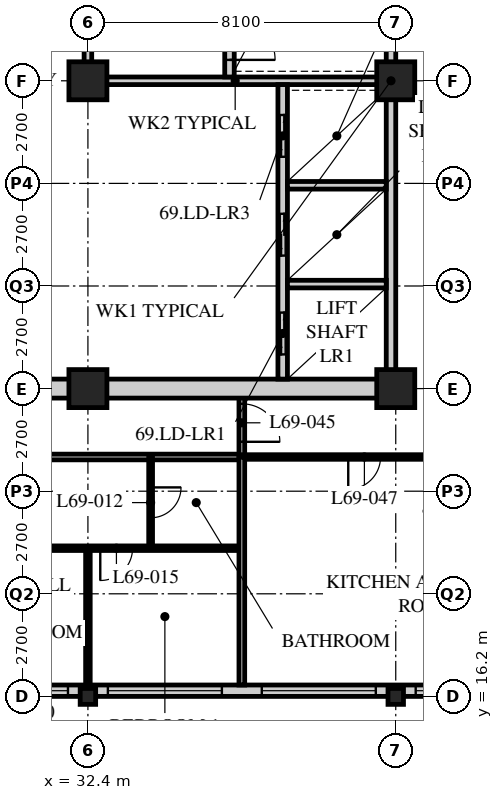
"""IFC4 building model, lengths in metres.
Left out: names, types, materials, properties, quantities, classifications, styles, units other than length and angle.
Written with IfcOpenShell. Run it as: python <this file> out.ifc"""

import sys

from ifc_helpers import new_model, si_unit, direction, frame, frame_2d, origin, origin_2d, place, context, subcontext, project, spatial, rectangle, hollow_rectangle, i_section, extrude, element, fill, save


model = new_model("IFC4")
c1 = context("Model", 3, precision=1e-05, world=origin(), true_north=direction((0.0, 1.0)))
c2 = subcontext(c1, "Body", "Model", "MODEL_VIEW")
j1 = project(units=[si_unit("LENGTHUNIT", "METRE"), si_unit("PLANEANGLEUNIT", "RADIAN")], contexts=[c1])
p1 = place(None, origin())
s1 = spatial("IfcSite", under=j1, at=p1, CompositionType="ELEMENT")
p2 = place(p1, origin())
s2 = spatial("IfcBuilding", under=s1, at=p2, CompositionType="ELEMENT")
p3 = place(p2, frame((0.0, 0.0, 269.7)))
s3 = spatial("IfcBuildingStorey", under=s2, at=p3, CompositionType="ELEMENT", Elevation=269.7)
p4 = place(p3, frame((32.4, 16.2, 0.0), z_axis=(0.0, 0.0, 1.0), x_axis=(1.0, 0.0, 0.0)))
e1 = element("IfcColumn", 1, at=p4, inside=s3, PredefinedType="COLUMN", context=c2, shape_type="SweptSolid", body=[
    extrude(i_section(OverallWidth=0.407, OverallDepth=0.419, WebThickness=0.031, FlangeThickness=0.049, FilletRadius=0.015, at=origin_2d()), origin(), (0.0, 0.0, 1.0), 3.9),
])
for number, where, z_axis, x_axis in (
    (2, (32.4, 24.3, 0.0), (0.0, 0.0, 1.0), (1.0, 0.0, 0.0)),
    (3, (32.4, 32.4, 0.0), (0.0, 0.0, 1.0), (1.0, 0.0, 0.0)),
):
    element("IfcColumn", number, at=place(p3, frame(where, z_axis=z_axis, x_axis=x_axis)), inside=s3, PredefinedType="COLUMN", context=c2, shape_type="SweptSolid", body=[
        extrude(hollow_rectangle(XDim=1.0, YDim=1.0, WallThickness=0.1, at=origin_2d()), origin(), (0.0, 0.0, 1.0), 3.9),
    ])
p5 = place(p3, frame((40.5, 16.2, 0.0), z_axis=(0.0, 0.0, 1.0), x_axis=(1.0, 0.0, 0.0)))
e4 = element("IfcColumn", 4, at=p5, inside=s3, PredefinedType="COLUMN", context=c2, shape_type="SweptSolid", body=[
    extrude(i_section(OverallWidth=0.407, OverallDepth=0.419, WebThickness=0.031, FlangeThickness=0.049, FilletRadius=0.015, at=origin_2d()), origin(), (0.0, 0.0, 1.0), 3.9),
])
for number, where, z_axis, x_axis in (
    (5, (40.5, 24.3, 0.0), (0.0, 0.0, 1.0), (1.0, 0.0, 0.0)),
    (6, (40.5, 32.4, 0.0), (0.0, 0.0, 1.0), (1.0, 0.0, 0.0)),
):
    element("IfcColumn", number, at=place(p3, frame(where, z_axis=z_axis, x_axis=x_axis)), inside=s3, PredefinedType="COLUMN", context=c2, shape_type="SweptSolid", body=[
        extrude(hollow_rectangle(XDim=1.0, YDim=1.0, WallThickness=0.1, at=origin_2d()), origin(), (0.0, 0.0, 1.0), 3.9),
    ])
p6 = place(p3, frame((8.4, 16.35, 0.0), z_axis=(0.0, 0.0, 1.0), x_axis=(1.0, 0.0, 0.0)))
e7 = element("IfcWall", 7, at=p6, inside=s3, PredefinedType="SOLIDWALL", context=c2, shape_type="SweptSolid", body=[
    extrude(rectangle(XDim=40.2, YDim=0.3, at=frame_2d((20.1, 0.0))), origin(), (0.0, 0.0, 1.0), 3.69),
])
p7 = place(p6, frame((0.225, 0.0, 0.6)))
e8 = element("IfcOpeningElement", 8, at=p7, cuts=e7, PredefinedType="OPENING", context=c2, shape_type="SweptSolid", body=[
    extrude(rectangle(XDim=3.0, YDim=2.4, at=frame_2d((1.5, 1.2))), frame((0.0, 0.16, 0.0), z_axis=(0.0, -1.0, 0.0), x_axis=(1.0, 0.0, 0.0)), (0.0, 0.0, 1.0), 0.32),
])
p8 = place(p6, frame((4.275, 0.0, 0.6)))
e9 = element("IfcOpeningElement", 9, at=p8, cuts=e7, PredefinedType="OPENING", context=c2, shape_type="SweptSolid", body=[
    extrude(rectangle(XDim=3.0, YDim=2.4, at=frame_2d((1.5, 1.2))), frame((0.0, 0.16, 0.0), z_axis=(0.0, -1.0, 0.0), x_axis=(1.0, 0.0, 0.0)), (0.0, 0.0, 1.0), 0.32),
])
p9 = place(p6, frame((8.325, 0.0, 0.6)))
e10 = element("IfcOpeningElement", 10, at=p9, cuts=e7, PredefinedType="OPENING", context=c2, shape_type="SweptSolid", body=[
    extrude(rectangle(XDim=3.0, YDim=2.4, at=frame_2d((1.5, 1.2))), frame((0.0, 0.16, 0.0), z_axis=(0.0, -1.0, 0.0), x_axis=(1.0, 0.0, 0.0)), (0.0, 0.0, 1.0), 0.32),
])
p10 = place(p6, frame((12.375, 0.0, 0.6)))
e11 = element("IfcOpeningElement", 11, at=p10, cuts=e7, PredefinedType="OPENING", context=c2, shape_type="SweptSolid", body=[
    extrude(rectangle(XDim=3.0, YDim=2.4, at=frame_2d((1.5, 1.2))), frame((0.0, 0.16, 0.0), z_axis=(0.0, -1.0, 0.0), x_axis=(1.0, 0.0, 0.0)), (0.0, 0.0, 1.0), 0.32),
])
p11 = place(p6, frame((16.425, 0.0, 0.6)))
e12 = element("IfcOpeningElement", 12, at=p11, cuts=e7, PredefinedType="OPENING", context=c2, shape_type="SweptSolid", body=[
    extrude(rectangle(XDim=3.0, YDim=2.4, at=frame_2d((1.5, 1.2))), frame((0.0, 0.16, 0.0), z_axis=(0.0, -1.0, 0.0), x_axis=(1.0, 0.0, 0.0)), (0.0, 0.0, 1.0), 0.32),
])
p12 = place(p6, frame((20.475, 0.0, 0.6)))
e13 = element("IfcOpeningElement", 13, at=p12, cuts=e7, PredefinedType="OPENING", context=c2, shape_type="SweptSolid", body=[
    extrude(rectangle(XDim=3.0, YDim=2.4, at=frame_2d((1.5, 1.2))), frame((0.0, 0.16, 0.0), z_axis=(0.0, -1.0, 0.0), x_axis=(1.0, 0.0, 0.0)), (0.0, 0.0, 1.0), 0.32),
])
p13 = place(p6, frame((24.525, 0.0, 0.6)))
e14 = element("IfcOpeningElement", 14, at=p13, cuts=e7, PredefinedType="OPENING", context=c2, shape_type="SweptSolid", body=[
    extrude(rectangle(XDim=3.0, YDim=2.4, at=frame_2d((1.5, 1.2))), frame((0.0, 0.16, 0.0), z_axis=(0.0, -1.0, 0.0), x_axis=(1.0, 0.0, 0.0)), (0.0, 0.0, 1.0), 0.32),
])
p14 = place(p6, frame((28.575, 0.0, 0.6)))
e15 = element("IfcOpeningElement", 15, at=p14, cuts=e7, PredefinedType="OPENING", context=c2, shape_type="SweptSolid", body=[
    extrude(rectangle(XDim=3.0, YDim=2.4, at=frame_2d((1.5, 1.2))), frame((0.0, 0.16, 0.0), z_axis=(0.0, -1.0, 0.0), x_axis=(1.0, 0.0, 0.0)), (0.0, 0.0, 1.0), 0.32),
])
p15 = place(p6, frame((32.625, 0.0, 0.6)))
e16 = element("IfcOpeningElement", 16, at=p15, cuts=e7, PredefinedType="OPENING", context=c2, shape_type="SweptSolid", body=[
    extrude(rectangle(XDim=3.0, YDim=2.4, at=frame_2d((1.5, 1.2))), frame((0.0, 0.16, 0.0), z_axis=(0.0, -1.0, 0.0), x_axis=(1.0, 0.0, 0.0)), (0.0, 0.0, 1.0), 0.32),
])
p16 = place(p6, frame((36.675, 0.0, 0.6)))
e17 = element("IfcOpeningElement", 17, at=p16, cuts=e7, PredefinedType="OPENING", context=c2, shape_type="SweptSolid", body=[
    extrude(rectangle(XDim=3.0, YDim=2.4, at=frame_2d((1.5, 1.2))), frame((0.0, 0.16, 0.0), z_axis=(0.0, -1.0, 0.0), x_axis=(1.0, 0.0, 0.0)), (0.0, 0.0, 1.0), 0.32),
])
p17 = place(p3, frame((12.15, 22.5, 0.0), z_axis=(0.0, 0.0, 1.0), x_axis=(1.0, 0.0, 0.0)))
e18 = element("IfcWall", 18, at=p17, inside=s3, PredefinedType="PARTITIONING", context=c2, shape_type="SweptSolid", body=[
    extrude(rectangle(XDim=24.3, YDim=0.15, at=frame_2d((12.15, 0.0))), origin(), (0.0, 0.0, 1.0), 3.69),
])
p18 = place(p17, frame((4.45, 0.0, 0.0)))
e19 = element("IfcOpeningElement", 19, at=p18, cuts=e18, PredefinedType="OPENING", context=c2, shape_type="SweptSolid", body=[
    extrude(rectangle(XDim=1.0, YDim=2.1, at=frame_2d((0.5, 1.05))), frame((0.0, 0.085, 0.0), z_axis=(0.0, -1.0, 0.0), x_axis=(1.0, 0.0, 0.0)), (0.0, 0.0, 1.0), 0.17),
])
p19 = place(p17, frame((12.55, 0.0, 0.0)))
e20 = element("IfcOpeningElement", 20, at=p19, cuts=e18, PredefinedType="OPENING", context=c2, shape_type="SweptSolid", body=[
    extrude(rectangle(XDim=1.0, YDim=2.1, at=frame_2d((0.5, 1.05))), frame((0.0, 0.085, 0.0), z_axis=(0.0, -1.0, 0.0), x_axis=(1.0, 0.0, 0.0)), (0.0, 0.0, 1.0), 0.17),
])
p20 = place(p17, frame((2.625, 0.0, 0.0)))
e21 = element("IfcOpeningElement", 21, at=p20, cuts=e18, PredefinedType="OPENING", context=c2, shape_type="SweptSolid", body=[
    extrude(rectangle(XDim=1.0, YDim=2.1, at=frame_2d((0.5, 1.05))), frame((0.0, 0.085, 0.0), z_axis=(0.0, -1.0, 0.0), x_axis=(1.0, 0.0, 0.0)), (0.0, 0.0, 1.0), 0.17),
])
p21 = place(p3, frame((36.45, 22.5, 0.0), z_axis=(0.0, 0.0, 1.0), x_axis=(0.0, 1.0, 0.0)))
e22 = element("IfcWall", 22, at=p21, inside=s3, PredefinedType="PARTITIONING", context=c2, shape_type="SweptSolid", body=[
    extrude(rectangle(XDim=1.8, YDim=0.15, at=frame_2d((0.9, 0.0))), origin(), (0.0, 0.0, 1.0), 3.69),
])
p22 = place(p21, frame((0.4, 0.0, 0.0)))
e23 = element("IfcOpeningElement", 23, at=p22, cuts=e22, PredefinedType="OPENING", context=c2, shape_type="SweptSolid", body=[
    extrude(rectangle(XDim=1.0, YDim=2.1, at=frame_2d((0.5, 1.05))), frame((0.0, 0.085, 0.0), z_axis=(0.0, -1.0, 0.0), x_axis=(1.0, 0.0, 0.0)), (0.0, 0.0, 1.0), 0.17),
])
p23 = place(p3, frame((34.05, 22.5, 0.0), z_axis=(0.0, 0.0, 1.0), x_axis=(0.0, -1.0, 0.0)))
e24 = element("IfcWall", 24, at=p23, inside=s3, PredefinedType="PARTITIONING", context=c2, shape_type="SweptSolid", body=[
    extrude(rectangle(XDim=2.4, YDim=0.1, at=frame_2d((1.2, 0.0))), origin(), (0.0, 0.0, 1.0), 3.69),
])
p24 = place(p23, frame((0.8, 0.0, 0.0)))
e25 = element("IfcOpeningElement", 25, at=p24, cuts=e24, PredefinedType="OPENING", context=c2, shape_type="SweptSolid", body=[
    extrude(rectangle(XDim=0.8, YDim=2.1, at=frame_2d((0.4, 1.05))), frame((0.0, 0.06, 0.0), z_axis=(0.0, -1.0, 0.0), x_axis=(1.0, 0.0, 0.0)), (0.0, 0.0, 1.0), 0.12),
])
p25 = place(p3, frame((32.4, 20.1, 0.0), z_axis=(0.0, 0.0, 1.0), x_axis=(0.0, -1.0, 0.0)))
e26 = element("IfcWall", 26, at=p25, inside=s3, PredefinedType="PARTITIONING", context=c2, shape_type="SweptSolid", body=[
    extrude(rectangle(XDim=3.6, YDim=0.12, at=frame_2d((1.8, 0.0))), origin(), (0.0, 0.0, 1.0), 3.078),
])
p26 = place(p3, frame((12.15, 20.1, 0.0), z_axis=(0.0, 0.0, 1.0), x_axis=(1.0, 0.0, 0.0)))
e27 = element("IfcWall", 27, at=p26, inside=s3, PredefinedType="PARTITIONING", context=c2, shape_type="SweptSolid", body=[
    extrude(rectangle(XDim=24.3, YDim=0.12, at=frame_2d((12.15, 0.0))), origin(), (0.0, 0.0, 1.0), 3.69),
])
p27 = place(p26, frame((5.025, 0.0, 0.0)))
e28 = element("IfcOpeningElement", 28, at=p27, cuts=e27, PredefinedType="OPENING", context=c2, shape_type="SweptSolid", body=[
    extrude(rectangle(XDim=0.85, YDim=2.1, at=frame_2d((0.425, 1.05))), frame((0.0, 0.07, 0.0), z_axis=(0.0, -1.0, 0.0), x_axis=(1.0, 0.0, 0.0)), (0.0, 0.0, 1.0), 0.14),
])
p28 = place(p26, frame((8.425, 0.0, 0.0)))
e29 = element("IfcOpeningElement", 29, at=p28, cuts=e27, PredefinedType="OPENING", context=c2, shape_type="SweptSolid", body=[
    extrude(rectangle(XDim=0.85, YDim=2.1, at=frame_2d((0.425, 1.05))), frame((0.0, 0.07, 0.0), z_axis=(0.0, -1.0, 0.0), x_axis=(1.0, 0.0, 0.0)), (0.0, 0.0, 1.0), 0.14),
])
p29 = place(p26, frame((13.125, 0.0, 0.0)))
e30 = element("IfcOpeningElement", 30, at=p29, cuts=e27, PredefinedType="OPENING", context=c2, shape_type="SweptSolid", body=[
    extrude(rectangle(XDim=0.85, YDim=2.1, at=frame_2d((0.425, 1.05))), frame((0.0, 0.07, 0.0), z_axis=(0.0, -1.0, 0.0), x_axis=(1.0, 0.0, 0.0)), (0.0, 0.0, 1.0), 0.14),
])
p30 = place(p26, frame((20.575, 0.0, 0.0)))
e31 = element("IfcOpeningElement", 31, at=p30, cuts=e27, PredefinedType="OPENING", context=c2, shape_type="SweptSolid", body=[
    extrude(rectangle(XDim=0.85, YDim=2.1, at=frame_2d((0.425, 1.05))), frame((0.0, 0.07, 0.0), z_axis=(0.0, -1.0, 0.0), x_axis=(1.0, 0.0, 0.0)), (0.0, 0.0, 1.0), 0.14),
])
p31 = place(p26, frame((2.725, 0.0, 0.0)))
e32 = element("IfcOpeningElement", 32, at=p31, cuts=e27, PredefinedType="OPENING", context=c2, shape_type="SweptSolid", body=[
    extrude(rectangle(XDim=0.85, YDim=2.1, at=frame_2d((0.425, 1.05))), frame((0.0, 0.07, 0.0), z_axis=(0.0, -1.0, 0.0), x_axis=(1.0, 0.0, 0.0)), (0.0, 0.0, 1.0), 0.14),
])
p32 = place(p3, frame((36.45, 22.5, 0.0), z_axis=(0.0, 0.0, 1.0), x_axis=(1.0, 0.0, 0.0)))
e33 = element("IfcWall", 33, at=p32, inside=s3, PredefinedType="PARTITIONING", context=c2, shape_type="SweptSolid", body=[
    extrude(rectangle(XDim=6.45, YDim=0.12, at=frame_2d((3.225, 0.0))), origin(), (0.0, 0.0, 1.0), 3.69),
])
p33 = place(p32, frame((2.8, 0.0, 0.0)))
e34 = element("IfcOpeningElement", 34, at=p33, cuts=e33, PredefinedType="OPENING", context=c2, shape_type="SweptSolid", body=[
    extrude(rectangle(XDim=0.85, YDim=2.1, at=frame_2d((0.425, 1.05))), frame((0.0, 0.07, 0.0), z_axis=(0.0, -1.0, 0.0), x_axis=(1.0, 0.0, 0.0)), (0.0, 0.0, 1.0), 0.14),
])
p34 = place(p3, frame((36.45, 16.5, 0.0), z_axis=(0.0, 0.0, 1.0), x_axis=(0.0, 1.0, 0.0)))
e35 = element("IfcWall", 35, at=p34, inside=s3, PredefinedType="PARTITIONING", context=c2, shape_type="SweptSolid", body=[
    extrude(rectangle(XDim=6.0, YDim=0.15, at=frame_2d((3.0, 0.0))), origin(), (0.0, 0.0, 1.0), 3.69),
])
p35 = place(p3, frame((15.95, 24.3, 0.0), z_axis=(0.0, 0.0, 1.0), x_axis=(1.0, 0.0, 0.0)))
e36 = element("IfcWall", 36, at=p35, inside=s3, PredefinedType="SOLIDWALL", context=c2, shape_type="SweptSolid", body=[
    extrude(rectangle(XDim=24.55, YDim=0.5, at=frame_2d((12.275, 0.0))), origin(), (0.0, 0.0, 1.0), 3.04),
])
p36 = place(p35, frame((11.5, 0.0, 0.0)))
e37 = element("IfcOpeningElement", 37, at=p36, cuts=e36, PredefinedType="OPENING", context=c2, shape_type="SweptSolid", body=[
    extrude(rectangle(XDim=1.8, YDim=2.4, at=frame_2d((0.9, 1.2))), frame((0.0, 0.26, 0.0), z_axis=(0.0, -1.0, 0.0), x_axis=(1.0, 0.0, 0.0)), (0.0, 0.0, 1.0), 0.52),
])
p37 = place(p3, frame((40.375, 24.55, 0.0), z_axis=(0.0, 0.0, 1.0), x_axis=(0.0, 1.0, 0.0)))
e38 = element("IfcWall", 38, at=p37, inside=s3, PredefinedType="SOLIDWALL", context=c2, shape_type="SweptSolid", body=[
    extrude(rectangle(XDim=15.7, YDim=0.25, at=frame_2d((7.85, 0.0))), origin(), (0.0, 0.0, 1.0), 3.078),
])
p38 = place(p3, frame((32.3, 32.4, 0.0), z_axis=(0.0, 0.0, 1.0), x_axis=(1.0, 0.0, 0.0)))
e39 = element("IfcWall", 39, at=p38, inside=s3, PredefinedType="SOLIDWALL", context=c2, shape_type="SweptSolid", body=[
    extrude(rectangle(XDim=7.95, YDim=0.2, at=frame_2d((3.975, 0.0))), origin(), (0.0, 0.0, 1.0), 3.078),
])
p39 = place(p3, frame((32.4, 32.5, 0.0), z_axis=(0.0, 0.0, 1.0), x_axis=(0.0, 1.0, 0.0)))
e40 = element("IfcWall", 40, at=p39, inside=s3, PredefinedType="SOLIDWALL", context=c2, shape_type="SweptSolid", body=[
    extrude(rectangle(XDim=7.75, YDim=0.2, at=frame_2d((3.875, 0.0))), origin(), (0.0, 0.0, 1.0), 3.078),
])
p40 = place(p39, frame((1.9, 0.0, 0.0)))
e41 = element("IfcOpeningElement", 41, at=p40, cuts=e40, PredefinedType="OPENING", context=c2, shape_type="SweptSolid", body=[
    extrude(rectangle(XDim=1.2, YDim=2.1, at=frame_2d((0.6, 1.05))), frame((0.0, 0.11, 0.0), z_axis=(0.0, -1.0, 0.0), x_axis=(1.0, 0.0, 0.0)), (0.0, 0.0, 1.0), 0.22),
])
p41 = place(p3, frame((37.525, 24.55, 0.0), z_axis=(0.0, 0.0, 1.0), x_axis=(0.0, 1.0, 0.0)))
e42 = element("IfcWall", 42, at=p41, inside=s3, PredefinedType="SOLIDWALL", context=c2, shape_type="SweptSolid", body=[
    extrude(rectangle(XDim=7.75, YDim=0.25, at=frame_2d((3.875, 0.0))), origin(), (0.0, 0.0, 1.0), 3.69),
])
p42 = place(p41, frame((0.65, 0.0, 0.0)))
e43 = element("IfcOpeningElement", 43, at=p42, cuts=e42, PredefinedType="OPENING", context=c2, shape_type="SweptSolid", body=[
    extrude(rectangle(XDim=1.1, YDim=2.4, at=frame_2d((0.55, 1.2))), frame((0.0, 0.135, 0.0), z_axis=(0.0, -1.0, 0.0), x_axis=(1.0, 0.0, 0.0)), (0.0, 0.0, 1.0), 0.27),
])
p43 = place(p41, frame((3.25, 0.0, 0.0)))
e44 = element("IfcOpeningElement", 44, at=p43, cuts=e42, PredefinedType="OPENING", context=c2, shape_type="SweptSolid", body=[
    extrude(rectangle(XDim=1.1, YDim=2.4, at=frame_2d((0.55, 1.2))), frame((0.0, 0.135, 0.0), z_axis=(0.0, -1.0, 0.0), x_axis=(1.0, 0.0, 0.0)), (0.0, 0.0, 1.0), 0.27),
])
p44 = place(p41, frame((5.85, 0.0, 0.0)))
e45 = element("IfcOpeningElement", 45, at=p44, cuts=e42, PredefinedType="OPENING", context=c2, shape_type="SweptSolid", body=[
    extrude(rectangle(XDim=1.1, YDim=2.4, at=frame_2d((0.55, 1.2))), frame((0.0, 0.135, 0.0), z_axis=(0.0, -1.0, 0.0), x_axis=(1.0, 0.0, 0.0)), (0.0, 0.0, 1.0), 0.27),
])
for number, where, z_axis, x_axis in (
    (46, (37.65, 27.05, 0.0), (0.0, 0.0, 1.0), (1.0, 0.0, 0.0)),
    (47, (37.65, 29.65, 0.0), (0.0, 0.0, 1.0), (1.0, 0.0, 0.0)),
):
    element("IfcWall", number, at=place(p3, frame(where, z_axis=z_axis, x_axis=x_axis)), inside=s3, PredefinedType="SOLIDWALL", context=c2, shape_type="SweptSolid", body=[
        extrude(rectangle(XDim=2.6, YDim=0.2, at=frame_2d((1.3, 0.0))), origin(), (0.0, 0.0, 1.0), 3.69),
    ])
p45 = place(p3, frame((36.125, 32.5, 0.0), z_axis=(0.0, 0.0, 1.0), x_axis=(0.0, 1.0, 0.0)))
e48 = element("IfcWall", 48, at=p45, inside=s3, PredefinedType="SOLIDWALL", context=c2, shape_type="SweptSolid", body=[
    extrude(rectangle(XDim=7.75, YDim=0.25, at=frame_2d((3.875, 0.0))), origin(), (0.0, 0.0, 1.0), 3.69),
])
p46 = place(p45, frame((0.45, 0.0, 0.0)))
e49 = element("IfcOpeningElement", 49, at=p46, cuts=e48, PredefinedType="OPENING", context=c2, shape_type="SweptSolid", body=[
    extrude(rectangle(XDim=1.2, YDim=2.1, at=frame_2d((0.6, 1.05))), frame((0.0, 0.135, 0.0), z_axis=(0.0, -1.0, 0.0), x_axis=(1.0, 0.0, 0.0)), (0.0, 0.0, 1.0), 0.27),
])
p47 = place(p12, origin())
e50 = element("IfcWindow", 50, at=p47, inside=s3, PartitioningType="SINGLE_PANEL", PredefinedType="WINDOW", context=c2, shape_type="SweptSolid", body=[
    extrude(rectangle(XDim=3.0, YDim=2.4, at=frame_2d((1.5, 1.2))), frame((0.0, 0.03, 0.0), z_axis=(0.0, -1.0, 0.0), x_axis=(1.0, 0.0, 0.0)), (0.0, 0.0, 1.0), 0.06),
])
fill(e13, e50)
p48 = place(p13, origin())
e51 = element("IfcWindow", 51, at=p48, inside=s3, PartitioningType="SINGLE_PANEL", PredefinedType="WINDOW", context=c2, shape_type="SweptSolid", body=[
    extrude(rectangle(XDim=3.0, YDim=2.4, at=frame_2d((1.5, 1.2))), frame((0.0, 0.03, 0.0), z_axis=(0.0, -1.0, 0.0), x_axis=(1.0, 0.0, 0.0)), (0.0, 0.0, 1.0), 0.06),
])
fill(e14, e51)
p49 = place(p14, origin())
e52 = element("IfcWindow", 52, at=p49, inside=s3, PartitioningType="SINGLE_PANEL", PredefinedType="WINDOW", context=c2, shape_type="SweptSolid", body=[
    extrude(rectangle(XDim=3.0, YDim=2.4, at=frame_2d((1.5, 1.2))), frame((0.0, 0.03, 0.0), z_axis=(0.0, -1.0, 0.0), x_axis=(1.0, 0.0, 0.0)), (0.0, 0.0, 1.0), 0.06),
])
fill(e15, e52)
p50 = place(p15, origin())
e53 = element("IfcWindow", 53, at=p50, inside=s3, PartitioningType="SINGLE_PANEL", PredefinedType="WINDOW", context=c2, shape_type="SweptSolid", body=[
    extrude(rectangle(XDim=3.0, YDim=2.4, at=frame_2d((1.5, 1.2))), frame((0.0, 0.03, 0.0), z_axis=(0.0, -1.0, 0.0), x_axis=(1.0, 0.0, 0.0)), (0.0, 0.0, 1.0), 0.06),
])
fill(e16, e53)
p51 = place(p24, origin())
e54 = element("IfcDoor", 54, at=p51, inside=s3, OperationType="SINGLE_SWING_LEFT", PredefinedType="DOOR", context=c2, shape_type="SweptSolid", body=[
    extrude(rectangle(XDim=0.8, YDim=2.1, at=frame_2d((0.4, 1.05))), frame((0.0, 0.025, 0.0), z_axis=(0.0, -1.0, 0.0), x_axis=(1.0, 0.0, 0.0)), (0.0, 0.0, 1.0), 0.05),
])
fill(e25, e54)
p52 = place(p30, origin())
e55 = element("IfcDoor", 55, at=p52, inside=s3, OperationType="SINGLE_SWING_RIGHT", PredefinedType="DOOR", context=c2, shape_type="SweptSolid", body=[
    extrude(rectangle(XDim=0.85, YDim=2.1, at=frame_2d((0.425, 1.05))), frame((0.0, 0.025, 0.0), z_axis=(0.0, -1.0, 0.0), x_axis=(1.0, 0.0, 0.0)), (0.0, 0.0, 1.0), 0.05),
])
fill(e31, e55)
p53 = place(p22, origin())
e56 = element("IfcDoor", 56, at=p53, inside=s3, OperationType="SINGLE_SWING_RIGHT", PredefinedType="DOOR", context=c2, shape_type="SweptSolid", body=[
    extrude(rectangle(XDim=1.0, YDim=2.1, at=frame_2d((0.5, 1.05))), frame((0.0, 0.025, 0.0), z_axis=(0.0, -1.0, 0.0), x_axis=(1.0, 0.0, 0.0)), (0.0, 0.0, 1.0), 0.05),
])
fill(e23, e56)
p54 = place(p33, origin())
e57 = element("IfcDoor", 57, at=p54, inside=s3, OperationType="SINGLE_SWING_RIGHT", PredefinedType="DOOR", context=c2, shape_type="SweptSolid", body=[
    extrude(rectangle(XDim=0.85, YDim=2.1, at=frame_2d((0.425, 1.05))), frame((0.0, 0.025, 0.0), z_axis=(0.0, -1.0, 0.0), x_axis=(1.0, 0.0, 0.0)), (0.0, 0.0, 1.0), 0.05),
])
fill(e34, e57)
p55 = place(p46, origin())
e58 = element("IfcDoor", 58, at=p55, inside=s3, OperationType="SINGLE_SWING_RIGHT", PredefinedType="DOOR", context=c2, shape_type="SweptSolid", body=[
    extrude(rectangle(XDim=1.2, YDim=2.1, at=frame_2d((0.6, 1.05))), frame((0.0, 0.025, 0.0), z_axis=(0.0, -1.0, 0.0), x_axis=(1.0, 0.0, 0.0)), (0.0, 0.0, 1.0), 0.05),
])
fill(e49, e58)
p56 = place(p42, origin())
e59 = element("IfcDoor", 59, at=p56, inside=s3, OperationType="DOUBLE_DOOR_SLIDING", PredefinedType="DOOR", context=c2, shape_type="SweptSolid", body=[
    extrude(rectangle(XDim=1.1, YDim=2.4, at=frame_2d((0.55, 1.2))), frame((0.0, 0.025, 0.0), z_axis=(0.0, -1.0, 0.0), x_axis=(1.0, 0.0, 0.0)), (0.0, 0.0, 1.0), 0.05),
])
fill(e43, e59)
p57 = place(p43, origin())
e60 = element("IfcDoor", 60, at=p57, inside=s3, OperationType="DOUBLE_DOOR_SLIDING", PredefinedType="DOOR", context=c2, shape_type="SweptSolid", body=[
    extrude(rectangle(XDim=1.1, YDim=2.4, at=frame_2d((0.55, 1.2))), frame((0.0, 0.025, 0.0), z_axis=(0.0, -1.0, 0.0), x_axis=(1.0, 0.0, 0.0)), (0.0, 0.0, 1.0), 0.05),
])
fill(e44, e60)
p58 = place(p44, origin())
e61 = element("IfcDoor", 61, at=p58, inside=s3, OperationType="DOUBLE_DOOR_SLIDING", PredefinedType="DOOR", context=c2, shape_type="SweptSolid", body=[
    extrude(rectangle(XDim=1.1, YDim=2.4, at=frame_2d((0.55, 1.2))), frame((0.0, 0.025, 0.0), z_axis=(0.0, -1.0, 0.0), x_axis=(1.0, 0.0, 0.0)), (0.0, 0.0, 1.0), 0.05),
])
fill(e45, e61)
save(model, sys.argv[1])
